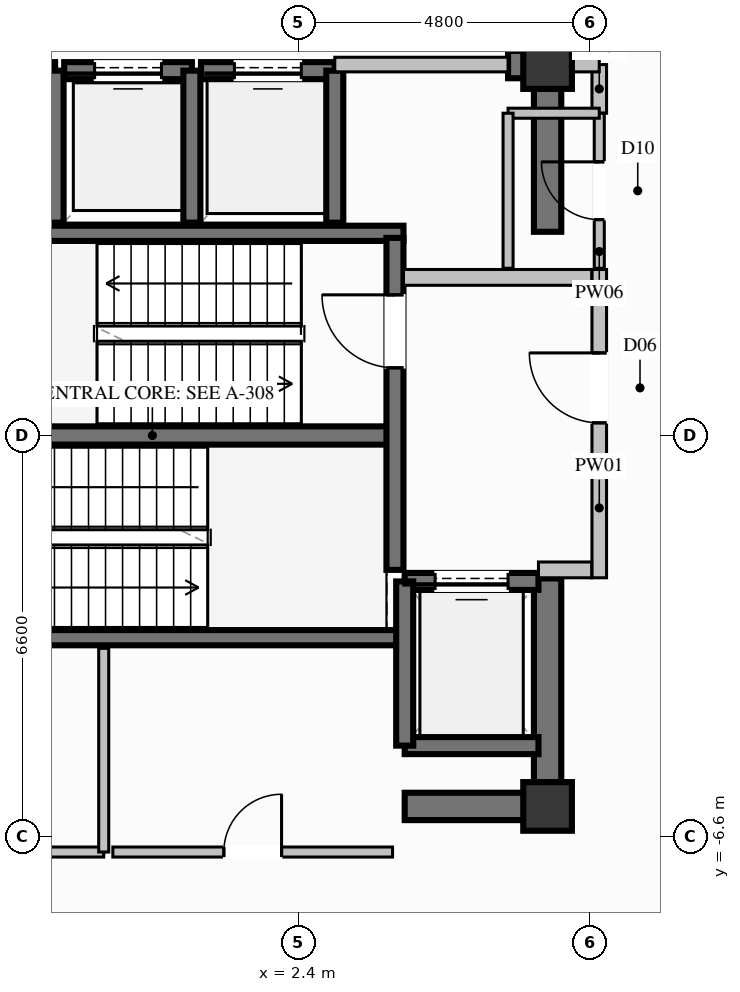
"""IFC4 building model, lengths in metres.
Left out: names, types, materials, properties, quantities, classifications, styles, units other than length and angle.
Written with IfcOpenShell. Run it as: python <this file> out.ifc"""

import sys

from ifc_helpers import new_model, si_unit, direction, frame, frame_2d, origin, origin_2d, place, context, subcontext, project, spatial, rectangle, extrude, element, fill, save


model = new_model("IFC4")
c1 = context("Model", 3, precision=1e-05, world=origin(), true_north=direction((0.0, 1.0)))
c2 = subcontext(c1, "Body", "Model", "MODEL_VIEW")
j1 = project(units=[si_unit("LENGTHUNIT", "METRE"), si_unit("PLANEANGLEUNIT", "RADIAN")], contexts=[c1])
p1 = place(None, origin())
s1 = spatial("IfcSite", under=j1, at=p1, CompositionType="ELEMENT")
p2 = place(p1, origin())
s2 = spatial("IfcBuilding", under=s1, at=p2, CompositionType="ELEMENT")
p3 = place(p2, frame((0.0, 0.0, 262.0)))
s3 = spatial("IfcBuildingStorey", under=s2, at=p3, CompositionType="ELEMENT", Elevation=262.0)
for number, where, z_axis, x_axis in (
    (1, (6.5, -6.1, 0.0), (0.0, 0.0, 1.0), (1.0, 0.0, 0.0)),
    (2, (6.5, 6.1, 0.0), (0.0, 0.0, 1.0), (1.0, 0.0, 0.0)),
):
    element("IfcColumn", number, at=place(p3, frame(where, z_axis=z_axis, x_axis=x_axis)), inside=s3, PredefinedType="COLUMN", context=c2, shape_type="SweptSolid", body=[
        extrude(rectangle(XDim=0.8, YDim=0.8, at=origin_2d()), origin(), (0.0, 0.0, 1.0), 4.8),
    ])
p4 = place(p3, frame((-3.99, 0.0, 0.0), z_axis=(0.0, 0.0, 1.0), x_axis=(1.0, 0.0, 0.0)))
e3 = element("IfcWall", 3, at=p4, inside=s3, PredefinedType="SHEAR", context=c2, shape_type="SweptSolid", body=[
    extrude(rectangle(XDim=7.98, YDim=0.3, at=frame_2d((3.99, 0.0))), origin(), (0.0, 0.0, 1.0), 4.8),
])
for number, where, z_axis, x_axis in (
    (4, (-4.13, -3.325, 0.0), (0.0, 0.0, 1.0), (1.0, 0.0, 0.0)),
    (5, (-4.13, 3.325, 0.0), (0.0, 0.0, 1.0), (1.0, 0.0, 0.0)),
):
    element("IfcWall", number, at=place(p3, frame(where, z_axis=z_axis, x_axis=x_axis)), inside=s3, PredefinedType="SOLIDWALL", context=c2, shape_type="SweptSolid", body=[
        extrude(rectangle(XDim=8.26, YDim=0.25, at=frame_2d((4.13, 0.0))), origin(), (0.0, 0.0, 1.0), 4.8),
    ])
p5 = place(p3, frame((4.15, -6.1, 0.0), z_axis=(0.0, 0.0, 1.0), x_axis=(1.0, 0.0, 0.0)))
e6 = element("IfcWall", 6, at=p5, inside=s3, PredefinedType="SHEAR", context=c2, shape_type="SweptSolid", body=[
    extrude(rectangle(XDim=2.125, YDim=0.45, at=frame_2d((1.062, 0.0))), origin(), (0.0, 0.0, 1.0), 4.8),
])
p6 = place(p3, frame((5.85, 6.1, 0.0), z_axis=(0.0, 0.0, 1.0), x_axis=(1.0, 0.0, 0.0)))
e7 = element("IfcWall", 7, at=p6, inside=s3, PredefinedType="SHEAR", context=c2, shape_type="SweptSolid", body=[
    extrude(rectangle(XDim=0.425, YDim=0.45, at=frame_2d((0.212, 0.0))), origin(), (0.0, 0.0, 1.0), 4.8),
])
p7 = place(p3, frame((6.5, -6.325, 0.0), z_axis=(0.0, 0.0, 1.0), x_axis=(0.0, 1.0, 0.0)))
e8 = element("IfcWall", 8, at=p7, inside=s3, PredefinedType="SHEAR", context=c2, shape_type="SweptSolid", body=[
    extrude(rectangle(XDim=3.975, YDim=0.45, at=frame_2d((1.987, 0.0))), origin(), (0.0, 0.0, 1.0), 4.8),
])
p8 = place(p3, frame((6.5, 3.35, 0.0), z_axis=(0.0, 0.0, 1.0), x_axis=(0.0, 1.0, 0.0)))
e9 = element("IfcWall", 9, at=p8, inside=s3, PredefinedType="SHEAR", context=c2, shape_type="SweptSolid", body=[
    extrude(rectangle(XDim=2.975, YDim=0.45, at=frame_2d((1.487, 0.0))), origin(), (0.0, 0.0, 1.0), 4.8),
])
p9 = place(p3, frame((-1.6, 6.0, 0.0), z_axis=(0.0, 0.0, 1.0), x_axis=(-1.0, 0.0, 0.0)))
e10 = element("IfcWall", 10, at=p9, inside=s3, PredefinedType="SOLIDWALL", context=c2, shape_type="SweptSolid", body=[
    extrude(rectangle(XDim=2.1, YDim=0.28, at=frame_2d((1.05, 0.0))), origin(), (0.0, 0.0, 1.0), 4.57),
])
p10 = place(p9, frame((0.5, 0.0, 0.0)))
e11 = element("IfcOpeningElement", 11, at=p10, cuts=e10, PredefinedType="OPENING", context=c2, shape_type="SweptSolid", body=[
    extrude(rectangle(XDim=1.1, YDim=2.2, at=frame_2d((0.55, 1.1))), frame((0.0, 0.15, 0.0), z_axis=(0.0, -1.0, 0.0), x_axis=(1.0, 0.0, 0.0)), (0.0, 0.0, 1.0), 0.3),
])
p11 = place(p3, frame((-1.6, 3.5, 0.0), z_axis=(0.0, 0.0, 1.0), x_axis=(0.0, 1.0, 0.0)))
e12 = element("IfcWall", 12, at=p11, inside=s3, PredefinedType="SOLIDWALL", context=c2, shape_type="SweptSolid", body=[
    extrude(rectangle(XDim=2.5, YDim=0.28, at=frame_2d((1.25, 0.0))), origin(), (0.0, 0.0, 1.0), 4.57),
])
p12 = place(p3, frame((0.65, 6.0, 0.0), z_axis=(0.0, 0.0, 1.0), x_axis=(-1.0, 0.0, 0.0)))
e13 = element("IfcWall", 13, at=p12, inside=s3, PredefinedType="SOLIDWALL", context=c2, shape_type="SweptSolid", body=[
    extrude(rectangle(XDim=2.1, YDim=0.28, at=frame_2d((1.05, 0.0))), origin(), (0.0, 0.0, 1.0), 4.57),
])
p13 = place(p12, frame((0.5, 0.0, 0.0)))
e14 = element("IfcOpeningElement", 14, at=p13, cuts=e13, PredefinedType="OPENING", context=c2, shape_type="SweptSolid", body=[
    extrude(rectangle(XDim=1.1, YDim=2.2, at=frame_2d((0.55, 1.1))), frame((0.0, 0.15, 0.0), z_axis=(0.0, -1.0, 0.0), x_axis=(1.0, 0.0, 0.0)), (0.0, 0.0, 1.0), 0.3),
])
p14 = place(p3, frame((0.65, 3.5, 0.0), z_axis=(0.0, 0.0, 1.0), x_axis=(0.0, 1.0, 0.0)))
e15 = element("IfcWall", 15, at=p14, inside=s3, PredefinedType="SOLIDWALL", context=c2, shape_type="SweptSolid", body=[
    extrude(rectangle(XDim=2.5, YDim=0.28, at=frame_2d((1.25, 0.0))), origin(), (0.0, 0.0, 1.0), 4.57),
])
p15 = place(p3, frame((3.0, 6.0, 0.0), z_axis=(0.0, 0.0, 1.0), x_axis=(-1.0, 0.0, 0.0)))
e16 = element("IfcWall", 16, at=p15, inside=s3, PredefinedType="SOLIDWALL", context=c2, shape_type="SweptSolid", body=[
    extrude(rectangle(XDim=2.2, YDim=0.28, at=frame_2d((1.1, 0.0))), origin(), (0.0, 0.0, 1.0), 4.57),
])
p16 = place(p15, frame((0.55, 0.0, 0.0)))
e17 = element("IfcOpeningElement", 17, at=p16, cuts=e16, PredefinedType="OPENING", context=c2, shape_type="SweptSolid", body=[
    extrude(rectangle(XDim=1.1, YDim=2.2, at=frame_2d((0.55, 1.1))), frame((0.0, 0.15, 0.0), z_axis=(0.0, -1.0, 0.0), x_axis=(1.0, 0.0, 0.0)), (0.0, 0.0, 1.0), 0.3),
])
p17 = place(p3, frame((3.0, 3.5, 0.0), z_axis=(0.0, 0.0, 1.0), x_axis=(0.0, 1.0, 0.0)))
e18 = element("IfcWall", 18, at=p17, inside=s3, PredefinedType="SOLIDWALL", context=c2, shape_type="SweptSolid", body=[
    extrude(rectangle(XDim=2.5, YDim=0.28, at=frame_2d((1.25, 0.0))), origin(), (0.0, 0.0, 1.0), 4.57),
])
p18 = place(p3, frame((4.15, -5.1, 0.0), z_axis=(0.0, 0.0, 1.0), x_axis=(1.0, 0.0, 0.0)))
e19 = element("IfcWall", 19, at=p18, inside=s3, PredefinedType="SOLIDWALL", context=c2, shape_type="SweptSolid", body=[
    extrude(rectangle(XDim=2.2, YDim=0.28, at=frame_2d((1.1, 0.0))), origin(), (0.0, 0.0, 1.0), 4.57),
])
p19 = place(p3, frame((6.35, -2.4, 0.0), z_axis=(0.0, 0.0, 1.0), x_axis=(-1.0, 0.0, 0.0)))
e20 = element("IfcWall", 20, at=p19, inside=s3, PredefinedType="SOLIDWALL", context=c2, shape_type="SweptSolid", body=[
    extrude(rectangle(XDim=2.2, YDim=0.28, at=frame_2d((1.1, 0.0))), origin(), (0.0, 0.0, 1.0), 4.57),
])
p20 = place(p19, frame((0.5, 0.0, 0.0)))
e21 = element("IfcOpeningElement", 21, at=p20, cuts=e20, PredefinedType="OPENING", context=c2, shape_type="SweptSolid", body=[
    extrude(rectangle(XDim=1.2, YDim=2.2, at=frame_2d((0.6, 1.1))), frame((0.0, 0.15, 0.0), z_axis=(0.0, -1.0, 0.0), x_axis=(1.0, 0.0, 0.0)), (0.0, 0.0, 1.0), 0.3),
])
p21 = place(p3, frame((4.15, -2.4, 0.0), z_axis=(0.0, 0.0, 1.0), x_axis=(0.0, -1.0, 0.0)))
e22 = element("IfcWall", 22, at=p21, inside=s3, PredefinedType="SOLIDWALL", context=c2, shape_type="SweptSolid", body=[
    extrude(rectangle(XDim=2.7, YDim=0.28, at=frame_2d((1.35, 0.0))), origin(), (0.0, 0.0, 1.0), 4.57),
])
p22 = place(p3, frame((3.99, -2.21, 0.0), z_axis=(0.0, 0.0, 1.0), x_axis=(0.0, 1.0, 0.0)))
e23 = element("IfcWall", 23, at=p22, inside=s3, PredefinedType="SOLIDWALL", context=c2, shape_type="SweptSolid", body=[
    extrude(rectangle(XDim=5.46, YDim=0.28, at=frame_2d((2.73, 0.0))), origin(), (0.0, 0.0, 1.0), 4.57),
])
p23 = place(p22, frame((3.323, 0.0, 0.0)))
e24 = element("IfcOpeningElement", 24, at=p23, cuts=e23, PredefinedType="OPENING", context=c2, shape_type="SweptSolid", body=[
    extrude(rectangle(XDim=1.2, YDim=2.2, at=frame_2d((0.6, 1.1))), frame((0.0, 0.15, 0.0), z_axis=(0.0, -1.0, 0.0), x_axis=(1.0, 0.0, 0.0)), (0.0, 0.0, 1.0), 0.3),
])
p24 = place(p3, frame((7.35, -2.34, 0.0), z_axis=(0.0, 0.0, 1.0), x_axis=(0.0, 1.0, 0.0)))
e25 = element("IfcWall", 25, at=p24, inside=s3, PredefinedType="PARTITIONING", context=c2, shape_type="SweptSolid", body=[
    extrude(rectangle(XDim=5.07, YDim=0.24, at=frame_2d((2.535, 0.0))), origin(), (0.0, 0.0, 1.0), 3.455),
])
p25 = place(p24, frame((2.548, 0.0, 0.0)))
e26 = element("IfcOpeningElement", 26, at=p25, cuts=e25, PredefinedType="OPENING", context=c2, shape_type="SweptSolid", body=[
    extrude(rectangle(XDim=1.15, YDim=2.2, at=frame_2d((0.575, 1.1))), frame((0.0, 0.13, 0.0), z_axis=(0.0, -1.0, 0.0), x_axis=(1.0, 0.0, 0.0)), (0.0, 0.0, 1.0), 0.26),
])
p26 = place(p3, frame((6.35, -2.21, 0.0), z_axis=(0.0, 0.0, 1.0), x_axis=(1.0, 0.0, 0.0)))
e27 = element("IfcWall", 27, at=p26, inside=s3, PredefinedType="PARTITIONING", context=c2, shape_type="SweptSolid", body=[
    extrude(rectangle(XDim=0.875, YDim=0.26, at=frame_2d((0.438, 0.0))), origin(), (0.0, 0.0, 1.0), 4.57),
])
p27 = place(p3, frame((4.13, 2.6, 0.0), z_axis=(0.0, 0.0, 1.0), x_axis=(1.0, 0.0, 0.0)))
e28 = element("IfcWall", 28, at=p27, inside=s3, PredefinedType="PARTITIONING", context=c2, shape_type="SweptSolid", body=[
    extrude(rectangle(XDim=3.095, YDim=0.26, at=frame_2d((1.548, 0.0))), origin(), (0.0, 0.0, 1.0), 4.57),
])
p28 = place(p3, frame((3.0, 6.1, 0.0), z_axis=(0.0, 0.0, 1.0), x_axis=(1.0, 0.0, 0.0)))
e29 = element("IfcWall", 29, at=p28, inside=s3, PredefinedType="PARTITIONING", context=c2, shape_type="SweptSolid", body=[
    extrude(rectangle(XDim=2.85, YDim=0.24, at=frame_2d((1.425, 0.0))), origin(), (0.0, 0.0, 1.0), 3.455),
])
p29 = place(p3, frame((7.35, 5.3, 0.0), z_axis=(0.0, 0.0, 1.0), x_axis=(0.0, 1.0, 0.0)))
e30 = element("IfcWall", 30, at=p29, inside=s3, PredefinedType="PARTITIONING", context=c2, shape_type="SweptSolid", body=[
    extrude(rectangle(XDim=0.8, YDim=0.24, at=frame_2d((0.4, 0.0))), origin(), (0.0, 0.0, 1.0), 3.455),
])
p30 = place(p3, frame((6.5, 6.1, 0.0), z_axis=(0.0, 0.0, 1.0), x_axis=(1.0, 0.0, 0.0)))
e31 = element("IfcWall", 31, at=p30, inside=s3, PredefinedType="PARTITIONING", context=c2, shape_type="SweptSolid", body=[
    extrude(rectangle(XDim=0.85, YDim=0.24, at=frame_2d((0.425, 0.0))), origin(), (0.0, 0.0, 1.0), 4.011),
])
p31 = place(p3, frame((7.35, 2.75, 0.0), z_axis=(0.0, 0.0, 1.0), x_axis=(0.0, 1.0, 0.0)))
e32 = element("IfcWall", 32, at=p31, inside=s3, PredefinedType="PARTITIONING", context=c2, shape_type="SweptSolid", body=[
    extrude(rectangle(XDim=2.55, YDim=0.165, at=frame_2d((1.275, 0.0))), origin(), (0.0, 0.0, 1.0), 3.455),
])
p32 = place(p31, frame((0.8, 0.0, 0.0)))
e33 = element("IfcOpeningElement", 33, at=p32, cuts=e32, PredefinedType="OPENING", context=c2, shape_type="SweptSolid", body=[
    extrude(rectangle(XDim=0.95, YDim=2.1, at=frame_2d((0.475, 1.05))), frame((0.0, 0.093, 0.0), z_axis=(0.0, -1.0, 0.0), x_axis=(1.0, 0.0, 0.0)), (0.0, 0.0, 1.0), 0.185),
])
p33 = place(p3, frame((7.35, 5.3, 0.0), z_axis=(0.0, 0.0, 1.0), x_axis=(-1.0, 0.0, 0.0)))
e34 = element("IfcWall", 34, at=p33, inside=s3, PredefinedType="PARTITIONING", context=c2, shape_type="SweptSolid", body=[
    extrude(rectangle(XDim=1.5, YDim=0.165, at=frame_2d((0.75, 0.0))), origin(), (0.0, 0.0, 1.0), 3.455),
])
p34 = place(p3, frame((5.85, 5.3, 0.0), z_axis=(0.0, 0.0, 1.0), x_axis=(0.0, -1.0, 0.0)))
e35 = element("IfcWall", 35, at=p34, inside=s3, PredefinedType="PARTITIONING", context=c2, shape_type="SweptSolid", body=[
    extrude(rectangle(XDim=2.55, YDim=0.165, at=frame_2d((1.275, 0.0))), origin(), (0.0, 0.0, 1.0), 3.455),
])
p35 = place(p3, frame((-5.7, -6.85, 0.0), z_axis=(0.0, 0.0, 1.0), x_axis=(1.0, 0.0, 0.0)))
e36 = element("IfcWall", 36, at=p35, inside=s3, PredefinedType="PARTITIONING", context=c2, shape_type="SweptSolid", body=[
    extrude(rectangle(XDim=4.9, YDim=0.165, at=frame_2d((2.45, 0.0))), origin(), (0.0, 0.0, 1.0), 3.455),
])
p36 = place(p35, frame((1.975, 0.0, 0.0)))
e37 = element("IfcOpeningElement", 37, at=p36, cuts=e36, PredefinedType="OPENING", context=c2, shape_type="SweptSolid", body=[
    extrude(rectangle(XDim=0.95, YDim=2.1, at=frame_2d((0.475, 1.05))), frame((0.0, 0.093, 0.0), z_axis=(0.0, -1.0, 0.0), x_axis=(1.0, 0.0, 0.0)), (0.0, 0.0, 1.0), 0.185),
])
p37 = place(p3, frame((-0.8, -6.85, 0.0), z_axis=(0.0, 0.0, 1.0), x_axis=(0.0, 1.0, 0.0)))
e38 = element("IfcWall", 38, at=p37, inside=s3, PredefinedType="PARTITIONING", context=c2, shape_type="SweptSolid", body=[
    extrude(rectangle(XDim=3.35, YDim=0.165, at=frame_2d((1.675, 0.0))), origin(), (0.0, 0.0, 1.0), 4.57),
])
p38 = place(p3, frame((-0.65, -6.85, 0.0), z_axis=(0.0, 0.0, 1.0), x_axis=(1.0, 0.0, 0.0)))
e39 = element("IfcWall", 39, at=p38, inside=s3, PredefinedType="PARTITIONING", context=c2, shape_type="SweptSolid", body=[
    extrude(rectangle(XDim=4.6, YDim=0.165, at=frame_2d((2.3, 0.0))), origin(), (0.0, 0.0, 1.0), 3.455),
])
p39 = place(p38, frame((1.825, 0.0, 0.0)))
e40 = element("IfcOpeningElement", 40, at=p39, cuts=e39, PredefinedType="OPENING", context=c2, shape_type="SweptSolid", body=[
    extrude(rectangle(XDim=0.95, YDim=2.1, at=frame_2d((0.475, 1.05))), frame((0.0, 0.093, 0.0), z_axis=(0.0, -1.0, 0.0), x_axis=(1.0, 0.0, 0.0)), (0.0, 0.0, 1.0), 0.185),
])
p40 = place(p3, frame((7.35, 8.65, 0.0), z_axis=(0.0, 0.0, 1.0), x_axis=(0.851645088617, -0.524118920699, 0.0)))
e41 = element("IfcWall", 41, at=p40, inside=s3, PredefinedType="PARTITIONING", context=c2, shape_type="SweptSolid", body=[
    extrude(rectangle(XDim=4.436, YDim=0.19, at=frame_2d((2.218, 0.0))), origin(), (0.0, 0.0, 1.0), 4.57),
])
p41 = place(p40, frame((1.743, 0.0, 0.0)))
e42 = element("IfcOpeningElement", 42, at=p41, cuts=e41, PredefinedType="OPENING", context=c2, shape_type="SweptSolid", body=[
    extrude(rectangle(XDim=0.95, YDim=2.1, at=frame_2d((0.475, 1.05))), frame((0.0, 0.105, 0.0), z_axis=(0.0, -1.0, 0.0), x_axis=(1.0, 0.0, 0.0)), (0.0, 0.0, 1.0), 0.21),
])
p42 = place(p13, origin())
e43 = element("IfcDoor", 43, at=p42, inside=s3, OperationType="SLIDING_TO_LEFT", PredefinedType="DOOR", context=c2, shape_type="SweptSolid", body=[
    extrude(rectangle(XDim=1.1, YDim=2.2, at=frame_2d((0.55, 1.1))), frame((0.0, 0.025, 0.0), z_axis=(0.0, -1.0, 0.0), x_axis=(1.0, 0.0, 0.0)), (0.0, 0.0, 1.0), 0.05),
])
fill(e14, e43)
p43 = place(p16, origin())
e44 = element("IfcDoor", 44, at=p43, inside=s3, OperationType="SLIDING_TO_LEFT", PredefinedType="DOOR", context=c2, shape_type="SweptSolid", body=[
    extrude(rectangle(XDim=1.1, YDim=2.2, at=frame_2d((0.55, 1.1))), frame((0.0, 0.025, 0.0), z_axis=(0.0, -1.0, 0.0), x_axis=(1.0, 0.0, 0.0)), (0.0, 0.0, 1.0), 0.05),
])
fill(e17, e44)
p44 = place(p20, origin())
e45 = element("IfcDoor", 45, at=p44, inside=s3, OperationType="SLIDING_TO_LEFT", PredefinedType="DOOR", context=c2, shape_type="SweptSolid", body=[
    extrude(rectangle(XDim=1.2, YDim=2.2, at=frame_2d((0.6, 1.1))), frame((0.0, 0.025, 0.0), z_axis=(0.0, -1.0, 0.0), x_axis=(1.0, 0.0, 0.0)), (0.0, 0.0, 1.0), 0.05),
])
fill(e21, e45)
p45 = place(p23, origin())
e46 = element("IfcDoor", 46, at=p45, inside=s3, OperationType="SINGLE_SWING_RIGHT", PredefinedType="DOOR", context=c2, shape_type="SweptSolid", body=[
    extrude(rectangle(XDim=1.2, YDim=2.2, at=frame_2d((0.6, 1.1))), frame((0.0, 0.025, 0.0), z_axis=(0.0, -1.0, 0.0), x_axis=(1.0, 0.0, 0.0)), (0.0, 0.0, 1.0), 0.05),
])
fill(e24, e46)
p46 = place(p25, origin())
e47 = element("IfcDoor", 47, at=p46, inside=s3, OperationType="SINGLE_SWING_RIGHT", PredefinedType="DOOR", context=c2, shape_type="SweptSolid", body=[
    extrude(rectangle(XDim=1.15, YDim=2.2, at=frame_2d((0.575, 1.1))), frame((0.0, 0.025, 0.0), z_axis=(0.0, -1.0, 0.0), x_axis=(1.0, 0.0, 0.0)), (0.0, 0.0, 1.0), 0.05),
])
fill(e26, e47)
p47 = place(p32, origin())
e48 = element("IfcDoor", 48, at=p47, inside=s3, OperationType="SINGLE_SWING_RIGHT", PredefinedType="DOOR", context=c2, shape_type="SweptSolid", body=[
    extrude(rectangle(XDim=0.95, YDim=2.1, at=frame_2d((0.475, 1.05))), frame((0.0, 0.025, 0.0), z_axis=(0.0, -1.0, 0.0), x_axis=(1.0, 0.0, 0.0)), (0.0, 0.0, 1.0), 0.05),
])
fill(e33, e48)
p48 = place(p39, origin())
e49 = element("IfcDoor", 49, at=p48, inside=s3, OperationType="SINGLE_SWING_RIGHT", PredefinedType="DOOR", context=c2, shape_type="SweptSolid", body=[
    extrude(rectangle(XDim=0.95, YDim=2.1, at=frame_2d((0.475, 1.05))), frame((0.0, 0.025, 0.0), z_axis=(0.0, -1.0, 0.0), x_axis=(1.0, 0.0, 0.0)), (0.0, 0.0, 1.0), 0.05),
])
fill(e40, e49)
save(model, sys.argv[1])
